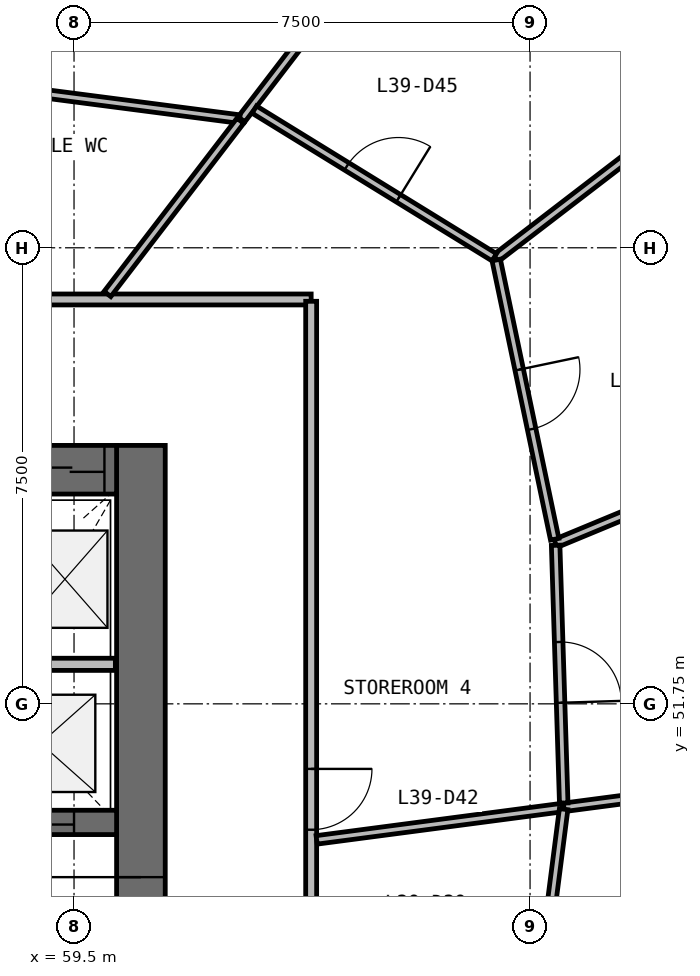
"""IFC4 building model, lengths in metres.
Left out: names, types, materials, properties, quantities, classifications, styles, units other than length and angle.
Written with IfcOpenShell. Run it as: python <this file> out.ifc"""

import sys

from ifc_helpers import new_model, si_unit, direction, frame, frame_2d, origin, place, context, subcontext, project, spatial, rectangle, extrude, source, transform, mapped, element, fill, save


model = new_model("IFC4")
c1 = context("Model", 3, precision=1e-05, world=origin(), true_north=direction((0.0, 1.0)))
c2 = subcontext(c1, "Body", "Model", "MODEL_VIEW")
j1 = project(units=[si_unit("LENGTHUNIT", "METRE"), si_unit("PLANEANGLEUNIT", "RADIAN")], contexts=[c1])
p1 = place(None, origin())
s1 = spatial("IfcSite", under=j1, at=p1, CompositionType="ELEMENT")
p2 = place(p1, origin())
s2 = spatial("IfcBuilding", under=s1, at=p2, CompositionType="ELEMENT")
p3 = place(p2, frame((0.0, 0.0, 164.3)))
s3 = spatial("IfcBuildingStorey", under=s2, at=p3, CompositionType="ELEMENT", Elevation=164.3)
p4 = place(p3, frame((60.6, 40.0, 0.0), z_axis=(0.0, 0.0, 1.0), x_axis=(0.0, 1.0, 0.0)))
e1 = element("IfcWall", 1, at=p4, inside=s3, PredefinedType="SHEAR", context=c2, shape_type="SweptSolid", body=[
    extrude(rectangle(XDim=16.0, YDim=0.8, at=frame_2d((8.0, 0.0))), origin(), (0.0, 0.0, 1.0), 3.9),
])
p5 = place(p4, frame((7.1, 0.0, 0.0)))
e2 = element("IfcOpeningElement", 2, at=p5, cuts=e1, PredefinedType="OPENING", context=c2, shape_type="SweptSolid", body=[
    extrude(rectangle(XDim=1.8, YDim=2.1, at=frame_2d((0.9, 1.05))), frame((0.0, 0.41, 0.0), z_axis=(0.0, -1.0, 0.0), x_axis=(1.0, 0.0, 0.0)), (0.0, 0.0, 1.0), 0.82),
])
p6 = place(p3, frame((60.2, 55.6, 0.0), z_axis=(0.0, 0.0, 1.0), x_axis=(-1.0, 0.0, 0.0)))
e3 = element("IfcWall", 3, at=p6, inside=s3, PredefinedType="SHEAR", context=c2, shape_type="SweptSolid", body=[
    extrude(rectangle(XDim=16.4, YDim=0.8, at=frame_2d((8.2, 0.0))), origin(), (0.0, 0.0, 1.0), 3.9),
])
p7 = place(p6, frame((0.2, 0.0, 0.0)))
e4 = element("IfcOpeningElement", 4, at=p7, cuts=e3, PredefinedType="OPENING", context=c2, shape_type="SweptSolid", body=[
    extrude(rectangle(XDim=1.1, YDim=2.1, at=frame_2d((0.55, 1.05))), frame((0.0, 0.41, 0.0), z_axis=(0.0, -1.0, 0.0), x_axis=(1.0, 0.0, 0.0)), (0.0, 0.0, 1.0), 0.82),
])
p8 = place(p6, frame((10.1, 0.0, 0.0)))
e5 = element("IfcOpeningElement", 5, at=p8, cuts=e3, PredefinedType="OPENING", context=c2, shape_type="SweptSolid", body=[
    extrude(rectangle(XDim=1.2, YDim=2.1, at=frame_2d((0.6, 1.05))), frame((0.0, 0.41, 0.0), z_axis=(0.0, -1.0, 0.0), x_axis=(1.0, 0.0, 0.0)), (0.0, 0.0, 1.0), 0.82),
])
p9 = place(p6, frame((7.05, 0.0, 0.0)))
e6 = element("IfcOpeningElement", 6, at=p9, cuts=e3, PredefinedType="OPENING", context=c2, shape_type="SweptSolid", body=[
    extrude(rectangle(XDim=1.1, YDim=2.1, at=frame_2d((0.55, 1.05))), frame((0.0, 0.41, 0.0), z_axis=(0.0, -1.0, 0.0), x_axis=(1.0, 0.0, 0.0)), (0.0, 0.0, 1.0), 0.82),
])
p10 = place(p3, frame((43.8, 49.8, 0.0), z_axis=(0.0, 0.0, 1.0), x_axis=(1.0, 0.0, 0.0)))
e7 = element("IfcWall", 7, at=p10, inside=s3, PredefinedType="SHEAR", context=c2, shape_type="SweptSolid", body=[
    extrude(rectangle(XDim=16.4, YDim=0.4, at=frame_2d((8.2, 0.0))), origin(), (0.0, 0.0, 1.0), 3.9),
])
p11 = place(p10, frame((9.6, 0.0, 0.0)))
e8 = element("IfcOpeningElement", 8, at=p11, cuts=e7, PredefinedType="OPENING", context=c2, shape_type="SweptSolid", body=[
    extrude(rectangle(XDim=1.1, YDim=2.1, at=frame_2d((0.55, 1.05))), frame((0.0, 0.21, 0.0), z_axis=(0.0, -1.0, 0.0), x_axis=(1.0, 0.0, 0.0)), (0.0, 0.0, 1.0), 0.42),
])
p12 = place(p10, frame((12.1, 0.0, 0.0)))
e9 = element("IfcOpeningElement", 9, at=p12, cuts=e7, PredefinedType="OPENING", context=c2, shape_type="SweptSolid", body=[
    extrude(rectangle(XDim=1.1, YDim=2.1, at=frame_2d((0.55, 1.05))), frame((0.0, 0.21, 0.0), z_axis=(0.0, -1.0, 0.0), x_axis=(1.0, 0.0, 0.0)), (0.0, 0.0, 1.0), 0.42),
])
p13 = place(p10, frame((14.6, 0.0, 0.0)))
e10 = element("IfcOpeningElement", 10, at=p13, cuts=e7, PredefinedType="OPENING", context=c2, shape_type="SweptSolid", body=[
    extrude(rectangle(XDim=1.1, YDim=2.1, at=frame_2d((0.55, 1.05))), frame((0.0, 0.21, 0.0), z_axis=(0.0, -1.0, 0.0), x_axis=(1.0, 0.0, 0.0)), (0.0, 0.0, 1.0), 0.42),
])
p14 = place(p10, frame((4.25, 0.0, 0.0)))
e11 = element("IfcOpeningElement", 11, at=p14, cuts=e7, PredefinedType="OPENING", context=c2, shape_type="SweptSolid", body=[
    extrude(rectangle(XDim=0.9, YDim=2.1, at=frame_2d((0.45, 1.05))), frame((0.0, 0.21, 0.0), z_axis=(0.0, -1.0, 0.0), x_axis=(1.0, 0.0, 0.0)), (0.0, 0.0, 1.0), 0.42),
])
p15 = place(p10, frame((7.65, 0.0, 0.0)))
e12 = element("IfcOpeningElement", 12, at=p15, cuts=e7, PredefinedType="OPENING", context=c2, shape_type="SweptSolid", body=[
    extrude(rectangle(XDim=0.9, YDim=2.1, at=frame_2d((0.45, 1.05))), frame((0.0, 0.21, 0.0), z_axis=(0.0, -1.0, 0.0), x_axis=(1.0, 0.0, 0.0)), (0.0, 0.0, 1.0), 0.42),
])
p16 = place(p3, frame((60.18, 52.4, 0.0), z_axis=(0.0, 0.0, 1.0), x_axis=(-1.0, 0.0, 0.0)))
e13 = element("IfcWall", 13, at=p16, inside=s3, PredefinedType="SOLIDWALL", context=c2, shape_type="SweptSolid", body=[
    extrude(rectangle(XDim=1.65, YDim=0.2, at=frame_2d((0.825, 0.0))), origin(), (0.0, 0.0, 1.0), 3.58),
])
p17 = place(p3, frame((40.6, 58.4, 0.0), z_axis=(0.0, 0.0, 1.0), x_axis=(1.0, 0.0, 0.0)))
e14 = element("IfcWall", 14, at=p17, inside=s3, PredefinedType="PARTITIONING", context=c2, shape_type="SweptSolid", body=[
    extrude(rectangle(XDim=22.8, YDim=0.18, at=frame_2d((11.4, 0.0))), origin(), (0.0, 0.0, 1.0), 2.88),
])
p18 = place(p17, frame((16.05, 0.0, 0.0)))
e15 = element("IfcOpeningElement", 15, at=p18, cuts=e14, PredefinedType="OPENING", context=c2, shape_type="SweptSolid", body=[
    extrude(rectangle(XDim=0.9, YDim=2.1, at=frame_2d((0.45, 1.05))), frame((0.0, 0.1, 0.0), z_axis=(0.0, -1.0, 0.0), x_axis=(1.0, 0.0, 0.0)), (0.0, 0.0, 1.0), 0.2),
])
p19 = place(p17, frame((13.05, 0.0, 0.0)))
e16 = element("IfcOpeningElement", 16, at=p19, cuts=e14, PredefinedType="OPENING", context=c2, shape_type="SweptSolid", body=[
    extrude(rectangle(XDim=0.9, YDim=2.1, at=frame_2d((0.45, 1.05))), frame((0.0, 0.1, 0.0), z_axis=(0.0, -1.0, 0.0), x_axis=(1.0, 0.0, 0.0)), (0.0, 0.0, 1.0), 0.2),
])
p20 = place(p17, frame((10.95, 0.0, 0.0)))
e17 = element("IfcOpeningElement", 17, at=p20, cuts=e14, PredefinedType="OPENING", context=c2, shape_type="SweptSolid", body=[
    extrude(rectangle(XDim=1.0, YDim=2.1, at=frame_2d((0.5, 1.05))), frame((0.0, 0.1, 0.0), z_axis=(0.0, -1.0, 0.0), x_axis=(1.0, 0.0, 0.0)), (0.0, 0.0, 1.0), 0.2),
])
p21 = place(p3, frame((63.4, 58.37, 0.0), z_axis=(0.0, 0.0, 1.0), x_axis=(0.0, -1.0, 0.0)))
e18 = element("IfcWall", 18, at=p21, inside=s3, PredefinedType="PARTITIONING", context=c2, shape_type="SweptSolid", body=[
    extrude(rectangle(XDim=20.74, YDim=0.18, at=frame_2d((10.37, 0.0))), origin(), (0.0, 0.0, 1.0), 2.88),
])
p22 = place(p21, frame((15.49, 0.0, 0.0)))
e19 = element("IfcOpeningElement", 19, at=p22, cuts=e18, PredefinedType="OPENING", context=c2, shape_type="SweptSolid", body=[
    extrude(rectangle(XDim=1.0, YDim=2.1, at=frame_2d((0.5, 1.05))), frame((0.0, 0.1, 0.0), z_axis=(0.0, -1.0, 0.0), x_axis=(1.0, 0.0, 0.0)), (0.0, 0.0, 1.0), 0.2),
])
p23 = place(p21, frame((9.89, 0.0, 0.0)))
e20 = element("IfcOpeningElement", 20, at=p23, cuts=e18, PredefinedType="OPENING", context=c2, shape_type="SweptSolid", body=[
    extrude(rectangle(XDim=1.0, YDim=2.1, at=frame_2d((0.5, 1.05))), frame((0.0, 0.1, 0.0), z_axis=(0.0, -1.0, 0.0), x_axis=(1.0, 0.0, 0.0)), (0.0, 0.0, 1.0), 0.2),
])
p24 = place(p21, frame((7.69, 0.0, 0.0)))
e21 = element("IfcOpeningElement", 21, at=p24, cuts=e18, PredefinedType="OPENING", context=c2, shape_type="SweptSolid", body=[
    extrude(rectangle(XDim=1.0, YDim=2.1, at=frame_2d((0.5, 1.05))), frame((0.0, 0.1, 0.0), z_axis=(0.0, -1.0, 0.0), x_axis=(1.0, 0.0, 0.0)), (0.0, 0.0, 1.0), 0.2),
])
p25 = place(p3, frame((67.556, 50.048, 0.0), z_axis=(0.0, 0.0, 1.0), x_axis=(0.991449473543, 0.130491154531, 0.0)))
e22 = element("IfcWall", 22, at=p25, inside=s3, PredefinedType="PARTITIONING", context=c2, shape_type="SweptSolid", body=[
    extrude(rectangle(XDim=7.066, YDim=0.14, at=frame_2d((3.533, 0.0))), origin(), (0.0, 0.0, 1.0), 2.88),
])
p26 = place(p3, frame((67.42, 54.387, 0.0), z_axis=(0.0, 0.0, 1.0), x_axis=(0.923884663142, 0.382671045691, 0.0)))
e23 = element("IfcWall", 23, at=p26, inside=s3, PredefinedType="PARTITIONING", context=c2, shape_type="SweptSolid", body=[
    extrude(rectangle(XDim=7.047, YDim=0.14, at=frame_2d((3.523, 0.0))), origin(), (0.0, 0.0, 1.0), 2.88),
])
p27 = place(p3, frame((62.253, 61.362, 0.0), z_axis=(0.0, 0.0, 1.0), x_axis=(0.608763124529, 0.79335203927, 0.0)))
e24 = element("IfcWall", 24, at=p27, inside=s3, PredefinedType="PARTITIONING", context=c2, shape_type="SweptSolid", body=[
    extrude(rectangle(XDim=6.677, YDim=0.14, at=frame_2d((3.338, 0.0))), origin(), (0.0, 0.0, 1.0), 2.88),
])
p28 = place(p27, frame((2.827, 0.0, 0.0)))
e25 = element("IfcOpeningElement", 25, at=p28, cuts=e24, PredefinedType="OPENING", context=c2, shape_type="SweptSolid", body=[
    extrude(rectangle(XDim=1.0, YDim=2.1, at=frame_2d((0.5, 1.05))), frame((0.0, 0.08, 0.0), z_axis=(0.0, -1.0, 0.0), x_axis=(1.0, 0.0, 0.0)), (0.0, 0.0, 1.0), 0.16),
])
p29 = place(p3, frame((66.437, 59.078, 0.0), z_axis=(0.0, 0.0, 1.0), x_axis=(0.793368198418, 0.608742065032, 0.0)))
e26 = element("IfcWall", 26, at=p29, inside=s3, PredefinedType="PARTITIONING", context=c2, shape_type="SweptSolid", body=[
    extrude(rectangle(XDim=6.288, YDim=0.14, at=frame_2d((3.144, 0.0))), origin(), (0.0, 0.0, 1.0), 2.88),
])
p30 = place(p3, frame((66.443, 59.049, 0.0), z_axis=(0.0, 0.0, 1.0), x_axis=(0.205034745767, -0.978754695022, 0.0)))
e27 = element("IfcWall", 27, at=p30, inside=s3, PredefinedType="PARTITIONING", context=c2, shape_type="SweptSolid", body=[
    extrude(rectangle(XDim=4.691, YDim=0.14, at=frame_2d((2.346, 0.0))), origin(), (0.0, 0.0, 1.0), 2.88),
])
p31 = place(p30, frame((1.842, 0.0, 0.0)))
e28 = element("IfcOpeningElement", 28, at=p31, cuts=e27, PredefinedType="OPENING", context=c2, shape_type="SweptSolid", body=[
    extrude(rectangle(XDim=1.0, YDim=2.1, at=frame_2d((0.5, 1.05))), frame((0.0, 0.08, 0.0), z_axis=(0.0, -1.0, 0.0), x_axis=(1.0, 0.0, 0.0)), (0.0, 0.0, 1.0), 0.16),
])
p32 = place(p3, frame((62.465, 61.523, 0.0), z_axis=(0.0, 0.0, 1.0), x_axis=(0.851618521929, -0.524162086675, 0.0)))
e29 = element("IfcWall", 29, at=p32, inside=s3, PredefinedType="PARTITIONING", context=c2, shape_type="SweptSolid", body=[
    extrude(rectangle(XDim=4.635, YDim=0.14, at=frame_2d((2.317, 0.0))), origin(), (0.0, 0.0, 1.0), 2.88),
])
p33 = place(p32, frame((1.785, 0.0, 0.0)))
e30 = element("IfcOpeningElement", 30, at=p33, cuts=e29, PredefinedType="OPENING", context=c2, shape_type="SweptSolid", body=[
    extrude(rectangle(XDim=1.0, YDim=2.1, at=frame_2d((0.5, 1.05))), frame((0.0, 0.08, 0.0), z_axis=(0.0, -1.0, 0.0), x_axis=(1.0, 0.0, 0.0)), (0.0, 0.0, 1.0), 0.16),
])
p34 = place(p3, frame((62.224, 61.366, 0.0), z_axis=(0.0, 0.0, 1.0), x_axis=(-0.991664939434, 0.128843501572, 0.0)))
e31 = element("IfcWall", 31, at=p34, inside=s3, PredefinedType="PARTITIONING", context=c2, shape_type="SweptSolid", body=[
    extrude(rectangle(XDim=4.485, YDim=0.14, at=frame_2d((2.243, 0.0))), origin(), (0.0, 0.0, 1.0), 2.88),
])
p35 = place(p3, frame((67.421, 54.357, 0.0), z_axis=(0.0, 0.0, 1.0), x_axis=(0.031374938864, -0.999507685419, 0.0)))
e32 = element("IfcWall", 32, at=p35, inside=s3, PredefinedType="PARTITIONING", context=c2, shape_type="SweptSolid", body=[
    extrude(rectangle(XDim=4.241, YDim=0.14, at=frame_2d((2.121, 0.0))), origin(), (0.0, 0.0, 1.0), 2.88),
])
p36 = place(p35, frame((1.591, 0.0, 0.0)))
e33 = element("IfcOpeningElement", 33, at=p36, cuts=e32, PredefinedType="OPENING", context=c2, shape_type="SweptSolid", body=[
    extrude(rectangle(XDim=1.0, YDim=2.1, at=frame_2d((0.5, 1.05))), frame((0.0, 0.08, 0.0), z_axis=(0.0, -1.0, 0.0), x_axis=(1.0, 0.0, 0.0)), (0.0, 0.0, 1.0), 0.16),
])
p37 = place(p3, frame((63.49, 49.513, 0.0), z_axis=(0.0, 0.0, 1.0), x_axis=(0.99144081821, 0.130556899422, 0.0)))
e34 = element("IfcWall", 34, at=p37, inside=s3, PredefinedType="PARTITIONING", context=c2, shape_type="SweptSolid", body=[
    extrude(rectangle(XDim=4.071, YDim=0.14, at=frame_2d((2.036, 0.0))), origin(), (0.0, 0.0, 1.0), 2.88),
])
p38 = place(p3, frame((67.552, 50.018, 0.0), z_axis=(0.0, 0.0, 1.0), x_axis=(-0.127345948967, -0.991858361502, 0.0)))
e35 = element("IfcWall", 35, at=p38, inside=s3, PredefinedType="PARTITIONING", context=c2, shape_type="SweptSolid", body=[
    extrude(rectangle(XDim=4.001, YDim=0.14, at=frame_2d((2.0, 0.0))), origin(), (0.0, 0.0, 1.0), 2.88),
])
p39 = place(p38, frame((1.551, 0.0, 0.0)))
e36 = element("IfcOpeningElement", 36, at=p39, cuts=e35, PredefinedType="OPENING", context=c2, shape_type="SweptSolid", body=[
    extrude(rectangle(XDim=1.0, YDim=2.1, at=frame_2d((0.5, 1.05))), frame((0.0, 0.08, 0.0), z_axis=(0.0, -1.0, 0.0), x_axis=(1.0, 0.0, 0.0)), (0.0, 0.0, 1.0), 0.16),
])
p40 = place(p3, frame((60.049, 58.49, 0.0), z_axis=(0.0, 0.0, 1.0), x_axis=(0.608786938026, 0.793333765882, 0.0)))
e37 = element("IfcWall", 37, at=p40, inside=s3, PredefinedType="PARTITIONING", context=c2, shape_type="SweptSolid", body=[
    extrude(rectangle(XDim=3.59, YDim=0.14, at=frame_2d((1.795, 0.0))), origin(), (0.0, 0.0, 1.0), 2.88),
])
m1 = source(origin(), c2, "Body", "SweptSolid", [
    extrude(rectangle(XDim=1.8, YDim=2.1, at=frame_2d((0.9, 1.05))), frame((0.0, 0.025, 0.0), z_axis=(0.0, -1.0, 0.0), x_axis=(1.0, 0.0, 0.0)), (0.0, 0.0, 1.0), 0.05),
])
p41 = place(p5, origin())
e38 = element("IfcDoor", 38, at=p41, inside=s3, OperationType="SINGLE_SWING_RIGHT", PredefinedType="DOOR", context=c2, shape_type="MappedRepresentation", body=[
    mapped(m1, transform((0.0, 0.0, 0.0), scale=1.0)),
])
fill(e2, e38)
m2 = source(origin(), c2, "Body", "SweptSolid", [
    extrude(rectangle(XDim=1.1, YDim=2.1, at=frame_2d((0.55, 1.05))), frame((0.0, 0.025, 0.0), z_axis=(0.0, -1.0, 0.0), x_axis=(1.0, 0.0, 0.0)), (0.0, 0.0, 1.0), 0.05),
])
p42 = place(p13, origin())
e39 = element("IfcDoor", 39, at=p42, inside=s3, OperationType="DOUBLE_DOOR_SLIDING", PredefinedType="USERDEFINED", context=c2, shape_type="MappedRepresentation", body=[
    mapped(m2, transform((0.0, 0.0, 0.0), scale=1.0)),
])
fill(e10, e39)
p43 = place(p7, origin())
e40 = element("IfcDoor", 40, at=p43, inside=s3, OperationType="DOUBLE_DOOR_SLIDING", PredefinedType="USERDEFINED", context=c2, shape_type="MappedRepresentation", body=[
    mapped(m2, transform((0.0, 0.0, 0.0), scale=1.0)),
])
fill(e4, e40)
m3 = source(origin(), c2, "Body", "SweptSolid", [
    extrude(rectangle(XDim=1.0, YDim=2.1, at=frame_2d((0.5, 1.05))), frame((0.0, 0.025, 0.0), z_axis=(0.0, -1.0, 0.0), x_axis=(1.0, 0.0, 0.0)), (0.0, 0.0, 1.0), 0.05),
])
p44 = place(p24, origin())
e41 = element("IfcDoor", 41, at=p44, inside=s3, OperationType="SINGLE_SWING_LEFT", PredefinedType="DOOR", context=c2, shape_type="MappedRepresentation", body=[
    mapped(m3, transform((0.0, 0.0, 0.0), scale=1.0)),
])
fill(e21, e41)
p45 = place(p36, origin())
e42 = element("IfcDoor", 42, at=p45, inside=s3, OperationType="SINGLE_SWING_RIGHT", PredefinedType="DOOR", context=c2, shape_type="MappedRepresentation", body=[
    mapped(m3, transform((0.0, 0.0, 0.0), scale=1.0)),
])
fill(e33, e42)
p46 = place(p31, origin())
e43 = element("IfcDoor", 43, at=p46, inside=s3, OperationType="SINGLE_SWING_LEFT", PredefinedType="DOOR", context=c2, shape_type="MappedRepresentation", body=[
    mapped(m3, transform((0.0, 0.0, 0.0), scale=1.0)),
])
fill(e28, e43)
p47 = place(p33, origin())
e44 = element("IfcDoor", 44, at=p47, inside=s3, OperationType="SINGLE_SWING_RIGHT", PredefinedType="DOOR", context=c2, shape_type="MappedRepresentation", body=[
    mapped(m3, transform((0.0, 0.0, 0.0), scale=1.0)),
])
fill(e30, e44)
save(model, sys.argv[1])
